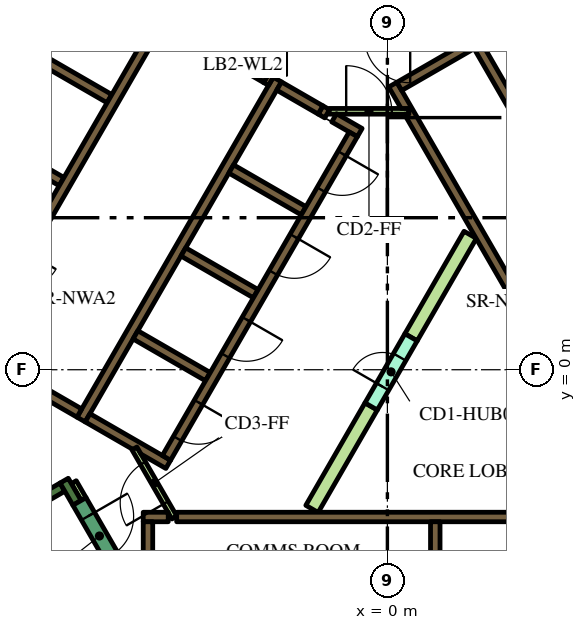
"""IFC4 building model, lengths in metres.
Left out: names, types, materials, properties, quantities, classifications, styles, units other than length and angle.
Written with IfcOpenShell. Run it as: python <this file> out.ifc"""

import sys

from ifc_helpers import new_model, si_unit, direction, frame, frame_2d, origin, place, context, subcontext, project, spatial, polyline, rectangle, outline, extrude, element, fill, save


model = new_model("IFC4")
c1 = context("Model", 3, precision=1e-05, world=origin(), true_north=direction((0.0, 1.0)))
c2 = subcontext(c1, "Body", "Model", "MODEL_VIEW")
j1 = project(units=[si_unit("LENGTHUNIT", "METRE"), si_unit("PLANEANGLEUNIT", "RADIAN")], contexts=[c1])
p1 = place(None, origin())
s1 = spatial("IfcSite", under=j1, at=p1, CompositionType="ELEMENT")
p2 = place(p1, origin())
s2 = spatial("IfcBuilding", under=s1, at=p2, CompositionType="ELEMENT")
p3 = place(p2, frame((0.0, 0.0, 111.0)))
s3 = spatial("IfcBuildingStorey", under=s2, at=p3, CompositionType="ELEMENT", Elevation=111.0)
p4 = place(p3, frame((-15.36, -1.503, 0.0), z_axis=(0.0, 0.0, 1.0), x_axis=(0.50000389221, 0.866023156604, 0.0)))
e1 = element("IfcWall", 1, at=p4, inside=s3, PredefinedType="SOLIDWALL", context=c2, shape_type="SweptSolid", body=[
    extrude(rectangle(XDim=21.0, YDim=0.9, at=frame_2d((10.5, 0.0))), origin(), (0.0, 0.0, 1.0), 3.9),
])
p5 = place(p3, frame((-14.44, -6.49, 0.0), z_axis=(0.0, 0.0, 1.0), x_axis=(0.866022966069, 0.500004222222, 0.0)))
e2 = element("IfcWall", 2, at=p5, inside=s3, PredefinedType="SOLIDWALL", context=c2, shape_type="SweptSolid", body=[
    extrude(rectangle(XDim=6.8, YDim=0.25, at=frame_2d((3.4, 0.0))), origin(), (0.0, 0.0, 1.0), 3.9),
])
p6 = place(p3, frame((-8.168, -3.503, 0.0), z_axis=(0.0, 0.0, 1.0), x_axis=(-0.499952099219, 0.866053057547, 0.0)))
e3 = element("IfcWall", 3, at=p6, inside=s3, PredefinedType="SOLIDWALL", context=c2, shape_type="SweptSolid", body=[
    extrude(rectangle(XDim=0.675, YDim=0.25, at=frame_2d((0.337, 0.0))), origin(), (0.0, 0.0, 1.0), 3.9),
])
p7 = place(p3, frame((-5.545, -3.875, 0.0), z_axis=(0.0, 0.0, 1.0), x_axis=(1.0, 0.0, 0.0)))
e4 = element("IfcWall", 4, at=p7, inside=s3, PredefinedType="SOLIDWALL", context=c2, shape_type="SweptSolid", body=[
    extrude(rectangle(XDim=11.97, YDim=0.25, at=frame_2d((5.985, 0.0))), origin(), (0.0, 0.0, 1.0), 3.9),
])
p8 = place(p3, frame((-6.425, -3.875, 0.0), z_axis=(0.0, 0.0, 1.0), x_axis=(1.0, 0.0, 0.0)))
e5 = element("IfcWall", 5, at=p8, inside=s3, PredefinedType="SOLIDWALL", context=c2, shape_type="SweptSolid", body=[
    extrude(rectangle(XDim=0.658, YDim=0.25, at=frame_2d((0.329, 0.0))), origin(), (0.0, 0.0, 1.0), 3.9),
])
p9 = place(p3, frame((1.26, -4.0, 0.0), z_axis=(0.0, 0.0, 1.0), x_axis=(0.0, -1.0, 0.0)))
e6 = element("IfcWall", 6, at=p9, inside=s3, PredefinedType="SOLIDWALL", context=c2, shape_type="SweptSolid", body=[
    extrude(rectangle(XDim=2.2, YDim=0.25, at=frame_2d((1.1, 0.0))), origin(), (0.0, 0.0, 1.0), 3.9),
])
p10 = place(p3, frame((-6.3, -4.0, 0.0), z_axis=(0.0, 0.0, 1.0), x_axis=(0.0, -1.0, 0.0)))
e7 = element("IfcWall", 7, at=p10, inside=s3, PredefinedType="SOLIDWALL", context=c2, shape_type="SweptSolid", body=[
    extrude(rectangle(XDim=3.154, YDim=0.25, at=frame_2d((1.577, 0.0))), origin(), (0.0, 0.0, 1.0), 3.9),
])
p11 = place(p3, origin())
e8 = element("IfcWall", 8, at=p11, inside=s3, PredefinedType="SOLIDWALL", context=c2, shape_type="SweptSolid", body=[
    extrude(outline(polyline([(0.566, 6.725), (0.566, 6.875), (0.566, 6.875), (0.565, 6.875), (0.361, 6.875), (0.035, 7.439), (0.252, 7.564), (0.377, 7.348), (6.552, -3.348), (6.677, -3.564), (6.46, -3.689), (0.448, 6.725), (0.565, 6.725), (0.566, 6.725), (0.566, 6.725)])), origin(), (0.0, 0.0, 1.0), 3.9),
])
p12 = place(p3, frame((0.314, 7.456, 0.0), z_axis=(0.0, 0.0, 1.0), x_axis=(0.866013897511, 0.50001992892, 0.0)))
e9 = element("IfcWall", 9, at=p12, inside=s3, PredefinedType="SOLIDWALL", context=c2, shape_type="SweptSolid", body=[
    extrude(rectangle(XDim=3.268, YDim=0.25, at=frame_2d((1.634, 0.0))), origin(), (0.0, 0.0, 1.0), 3.9),
])
p13 = place(p3, frame((-8.06, -1.311, 0.0), z_axis=(0.0, 0.0, 1.0), x_axis=(0.50000273126, 0.866023826885, 0.0)))
e10 = element("IfcWall", 10, at=p13, inside=s3, PredefinedType="SOLIDWALL", context=c2, shape_type="SweptSolid", body=[
    extrude(rectangle(XDim=10.33, YDim=0.25, at=frame_2d((5.165, 0.0))), origin(), (0.0, 0.0, 1.0), 3.9),
])
p14 = place(p3, frame((-1.758, 6.835, 0.0), z_axis=(0.0, 0.0, 1.0), x_axis=(0.865982457891, -0.500074377092, 0.0)))
e11 = element("IfcWall", 11, at=p14, inside=s3, PredefinedType="SOLIDWALL", context=c2, shape_type="SweptSolid", body=[
    extrude(rectangle(XDim=0.2, YDim=0.25, at=frame_2d((0.1, 0.0))), origin(), (0.0, 0.0, 1.0), 3.9),
])
p15 = place(p3, frame((-1.76, 6.836, 0.0), z_axis=(0.0, 0.0, 1.0), x_axis=(-0.865952863304, 0.500125622755, 0.0)))
e12 = element("IfcWall", 12, at=p15, inside=s3, PredefinedType="SOLIDWALL", context=c2, shape_type="SweptSolid", body=[
    extrude(rectangle(XDim=1.258, YDim=0.25, at=frame_2d((0.629, 0.0))), origin(), (0.0, 0.0, 1.0), 3.9),
])
p16 = place(p3, frame((-0.728, 6.24, 0.0), z_axis=(0.0, 0.0, 1.0), x_axis=(-0.865955664968, 0.500120771724, 0.0)))
e13 = element("IfcWall", 13, at=p16, inside=s3, PredefinedType="SOLIDWALL", context=c2, shape_type="SweptSolid", body=[
    extrude(rectangle(XDim=0.778, YDim=0.25, at=frame_2d((0.389, 0.0))), origin(), (0.0, 0.0, 1.0), 3.9),
])
for number, where, z_axis, x_axis in (
    (14, (-2.204, 4.182, 0.0), (0.0, 0.0, 1.0), (-0.866, 0.5, 0.0)),
    (15, (-5.369, 3.1, 0.0), (0.0, 0.0, 1.0), (0.866, -0.5, 0.0)),
    (16, (-4.724, -0.182, 0.0), (0.0, 0.0, 1.0), (-0.866, 0.5, 0.0)),
):
    element("IfcWall", number, at=place(p3, frame(where, z_axis=z_axis, x_axis=x_axis)), inside=s3, PredefinedType="SOLIDWALL", context=c2, shape_type="SweptSolid", body=[
        extrude(rectangle(XDim=2.2, YDim=0.25, at=frame_2d((1.1, 0.0))), origin(), (0.0, 0.0, 1.0), 3.9),
    ])
e17 = element("IfcWall", 17, at=p11, inside=s3, PredefinedType="SOLIDWALL", context=c2, shape_type="SweptSolid", body=[
    extrude(outline(polyline([(-5.922, -2.257), (-5.922, -2.257), (-5.705, -2.382), (-5.83, -2.598), (-6.483, -2.221), (-6.591, -2.033), (-6.591, -2.033), (-6.7, -2.096), (-7.952, -1.373), (-7.827, -1.156), (-5.922, -2.257)])), origin(), (0.0, 0.0, 1.0), 3.9),
])
p17 = place(p3, frame((-8.106, -1.14, 0.0), z_axis=(0.0, 0.0, 1.0), x_axis=(-0.866000643155, 0.500042884217, 0.0)))
e18 = element("IfcWall", 18, at=p17, inside=s3, PredefinedType="SOLIDWALL", context=c2, shape_type="SweptSolid", body=[
    extrude(rectangle(XDim=5.65, YDim=0.25, at=frame_2d((2.825, 0.0))), origin(), (0.0, 0.0, 1.0), 3.9),
])
e19 = element("IfcWall", 19, at=p11, inside=s3, PredefinedType="SOLIDWALL", context=c2, shape_type="SweptSolid", body=[
    extrude(outline(polyline([(-3.128, 7.481), (-3.259, 7.557), (-3.134, 7.773), (-3.003, 7.698), (-3.128, 7.481)])), origin(), (0.0, 0.0, 1.0), 3.9),
])
for number, where, z_axis, x_axis in (
    (20, (-8.574, 4.95, 0.0), (0.0, 0.0, 1.0), (-0.866, 0.5, 0.0)),
    (21, (-7.314, 7.132, 0.0), (0.0, 0.0, 1.0), (-0.866, 0.5, 0.0)),
):
    element("IfcWall", number, at=place(p3, frame(where, z_axis=z_axis, x_axis=x_axis)), inside=s3, PredefinedType="SOLIDWALL", context=c2, shape_type="SweptSolid", body=[
        extrude(rectangle(XDim=2.2, YDim=0.25, at=frame_2d((1.1, 0.0))), origin(), (0.0, 0.0, 1.0), 3.9),
    ])
p18 = place(p3, frame((-7.959, 10.415, 0.0), z_axis=(0.0, 0.0, 1.0), x_axis=(0.866020958405, -0.500007699544, 0.0)))
e22 = element("IfcWall", 22, at=p18, inside=s3, PredefinedType="SOLIDWALL", context=c2, shape_type="SweptSolid", body=[
    extrude(rectangle(XDim=4.1, YDim=0.25, at=frame_2d((2.05, 0.0))), origin(), (0.0, 0.0, 1.0), 3.9),
])
p19 = place(p3, frame((-8.252, -2.958, 0.0), z_axis=(0.0, 0.0, 1.0), x_axis=(0.500174715838, -0.865924508047, 0.0)))
e23 = element("IfcWall", 23, at=p19, inside=s3, PredefinedType="PARTITIONING", context=c2, shape_type="SweptSolid", body=[
    extrude(rectangle(XDim=0.514, YDim=0.15, at=frame_2d((0.257, 0.0))), origin(), (0.0, 0.0, 1.0), 2.75),
])
e24 = element("IfcWall", 24, at=p11, inside=s3, PredefinedType="PARTITIONING", context=c2, shape_type="SweptSolid", body=[
    extrude(outline(polyline([(-0.59, -0.872), (-0.265, -1.059), (-1.822, -3.756), (-2.147, -3.568), (-0.59, -0.872)])), origin(), (0.0, 0.0, 1.0), 2.75),
])
e25 = element("IfcWall", 25, at=p11, inside=s3, PredefinedType="PARTITIONING", context=c2, shape_type="SweptSolid", body=[
    extrude(outline(polyline([(2.017, 3.643), (2.342, 3.456), (0.785, 0.76), (0.46, 0.947), (2.017, 3.643)])), origin(), (0.0, 0.0, 1.0), 2.75),
])
p20 = place(p3, frame((8.565, -2.185, 0.0), z_axis=(0.0, 0.0, 1.0), x_axis=(-0.499997954832, 0.866026584559, 0.0)))
e26 = element("IfcWall", 26, at=p20, inside=s3, PredefinedType="SOLIDWALL", context=c2, shape_type="SweptSolid", body=[
    extrude(rectangle(XDim=12.35, YDim=0.25, at=frame_2d((6.175, 0.0))), origin(), (0.0, 0.0, 1.0), 3.9),
])
p21 = place(p20, frame((5.725, 0.0, 0.0)))
e27 = element("IfcOpeningElement", 27, at=p21, cuts=e26, PredefinedType="OPENING", context=c2, shape_type="SweptSolid", body=[
    extrude(rectangle(XDim=0.9, YDim=2.1, at=frame_2d((0.45, 1.05))), frame((0.0, 0.135, 0.0), z_axis=(0.0, -1.0, 0.0), x_axis=(1.0, 0.0, 0.0)), (0.0, 0.0, 1.0), 0.27),
])
p22 = place(p3, frame((-6.008, 9.144, 0.0), z_axis=(0.0, 0.0, 1.0), x_axis=(-0.500006956611, -0.866021387346, 0.0)))
e28 = element("IfcWall", 28, at=p22, inside=s3, PredefinedType="SOLIDWALL", context=c2, shape_type="SweptSolid", body=[
    extrude(rectangle(XDim=9.83, YDim=0.25, at=frame_2d((4.915, 0.0))), origin(), (0.0, 0.0, 1.0), 3.9),
])
p23 = place(p22, frame((6.985, 0.0, 0.0)))
e29 = element("IfcOpeningElement", 29, at=p23, cuts=e28, PredefinedType="OPENING", context=c2, shape_type="SweptSolid", body=[
    extrude(rectangle(XDim=0.9, YDim=2.1, at=frame_2d((0.45, 1.05))), frame((0.0, 0.135, 0.0), z_axis=(0.0, -1.0, 0.0), x_axis=(1.0, 0.0, 0.0)), (0.0, 0.0, 1.0), 0.27),
])
p24 = place(p3, frame((-0.898, 6.194, 0.0), z_axis=(0.0, 0.0, 1.0), x_axis=(-0.499996202215, -0.866027596426, 0.0)))
e30 = element("IfcWall", 30, at=p24, inside=s3, PredefinedType="SOLIDWALL", context=c2, shape_type="SweptSolid", body=[
    extrude(rectangle(XDim=9.83, YDim=0.25, at=frame_2d((4.915, 0.0))), origin(), (0.0, 0.0, 1.0), 3.9),
])
p25 = place(p24, frame((0.585, 0.0, 0.0)))
e31 = element("IfcOpeningElement", 31, at=p25, cuts=e30, PredefinedType="OPENING", context=c2, shape_type="SweptSolid", body=[
    extrude(rectangle(XDim=1.1, YDim=2.1, at=frame_2d((0.55, 1.05))), frame((0.0, 0.135, 0.0), z_axis=(0.0, -1.0, 0.0), x_axis=(1.0, 0.0, 0.0)), (0.0, 0.0, 1.0), 0.27),
])
p26 = place(p24, frame((3.105, 0.0, 0.0)))
e32 = element("IfcOpeningElement", 32, at=p26, cuts=e30, PredefinedType="OPENING", context=c2, shape_type="SweptSolid", body=[
    extrude(rectangle(XDim=1.1, YDim=2.1, at=frame_2d((0.55, 1.05))), frame((0.0, 0.135, 0.0), z_axis=(0.0, -1.0, 0.0), x_axis=(1.0, 0.0, 0.0)), (0.0, 0.0, 1.0), 0.27),
])
p27 = place(p24, frame((5.625, 0.0, 0.0)))
e33 = element("IfcOpeningElement", 33, at=p27, cuts=e30, PredefinedType="OPENING", context=c2, shape_type="SweptSolid", body=[
    extrude(rectangle(XDim=1.1, YDim=2.1, at=frame_2d((0.55, 1.05))), frame((0.0, 0.135, 0.0), z_axis=(0.0, -1.0, 0.0), x_axis=(1.0, 0.0, 0.0)), (0.0, 0.0, 1.0), 0.27),
])
p28 = place(p24, frame((8.145, 0.0, 0.0)))
e34 = element("IfcOpeningElement", 34, at=p28, cuts=e30, PredefinedType="OPENING", context=c2, shape_type="SweptSolid", body=[
    extrude(rectangle(XDim=1.1, YDim=2.1, at=frame_2d((0.55, 1.05))), frame((0.0, 0.135, 0.0), z_axis=(0.0, -1.0, 0.0), x_axis=(1.0, 0.0, 0.0)), (0.0, 0.0, 1.0), 0.27),
])
p29 = place(p3, frame((-8.103, -3.466, 0.0), z_axis=(0.0, 0.0, 1.0), x_axis=(0.500078061341, -0.865980330357, 0.0)))
e35 = element("IfcWall", 35, at=p29, inside=s3, PredefinedType="SOLIDWALL", context=c2, shape_type="SweptSolid", body=[
    extrude(rectangle(XDim=2.1, YDim=0.4, at=frame_2d((1.05, 0.0))), origin(), (0.0, 0.0, 1.0), 3.9),
])
p30 = place(p29, frame((0.45, 0.0, 0.0)))
e36 = element("IfcOpeningElement", 36, at=p30, cuts=e35, PredefinedType="OPENING", context=c2, shape_type="SweptSolid", body=[
    extrude(rectangle(XDim=1.2, YDim=2.1, at=frame_2d((0.6, 1.05))), frame((0.0, 0.21, 0.0), z_axis=(0.0, -1.0, 0.0), x_axis=(1.0, 0.0, 0.0)), (0.0, 0.0, 1.0), 0.42),
])
p31 = place(p3, frame((-0.427, -0.966, 0.0), z_axis=(0.0, 0.0, 1.0), x_axis=(0.49994051562, 0.866059744384, 0.0)))
e37 = element("IfcWall", 37, at=p31, inside=s3, PredefinedType="PARTITIONING", context=c2, shape_type="SweptSolid", body=[
    extrude(rectangle(XDim=2.1, YDim=0.375, at=frame_2d((1.05, 0.0))), origin(), (0.0, 0.0, 1.0), 2.75),
])
p32 = place(p31, frame((0.6, 0.0, 0.0)))
e38 = element("IfcOpeningElement", 38, at=p32, cuts=e37, PredefinedType="OPENING", context=c2, shape_type="SweptSolid", body=[
    extrude(rectangle(XDim=0.9, YDim=2.1, at=frame_2d((0.45, 1.05))), frame((0.0, 0.198, 0.0), z_axis=(0.0, -1.0, 0.0), x_axis=(1.0, 0.0, 0.0)), (0.0, 0.0, 1.0), 0.395),
])
p33 = place(p3, frame((-1.534, 6.8, 0.0), z_axis=(0.0, 0.0, 1.0), x_axis=(1.0, 0.0, 0.0)))
e39 = element("IfcWall", 39, at=p33, inside=s3, PredefinedType="PARTITIONING", context=c2, shape_type="SweptSolid", body=[
    extrude(rectangle(XDim=2.1, YDim=0.15, at=frame_2d((1.05, 0.0))), origin(), (0.0, 0.0, 1.0), 2.75),
])
p34 = place(p33, frame((0.45, 0.0, 0.0)))
e40 = element("IfcOpeningElement", 40, at=p34, cuts=e39, PredefinedType="OPENING", context=c2, shape_type="SweptSolid", body=[
    extrude(rectangle(XDim=1.2, YDim=2.1, at=frame_2d((0.6, 1.05))), frame((0.0, 0.085, 0.0), z_axis=(0.0, -1.0, 0.0), x_axis=(1.0, 0.0, 0.0)), (0.0, 0.0, 1.0), 0.17),
])
p35 = place(p3, frame((-5.606, -3.89, 0.0), z_axis=(0.0, 0.0, 1.0), x_axis=(-0.500027713859, 0.866009402589, 0.0)))
e41 = element("IfcWall", 41, at=p35, inside=s3, PredefinedType="PARTITIONING", context=c2, shape_type="SweptSolid", body=[
    extrude(rectangle(XDim=2.1, YDim=0.15, at=frame_2d((1.05, 0.0))), origin(), (0.0, 0.0, 1.0), 2.75),
])
p36 = place(p35, frame((0.45, 0.0, 0.0)))
e42 = element("IfcOpeningElement", 42, at=p36, cuts=e41, PredefinedType="OPENING", context=c2, shape_type="SweptSolid", body=[
    extrude(rectangle(XDim=1.2, YDim=2.1, at=frame_2d((0.6, 1.05))), frame((0.0, 0.085, 0.0), z_axis=(0.0, -1.0, 0.0), x_axis=(1.0, 0.0, 0.0)), (0.0, 0.0, 1.0), 0.17),
])
p37 = place(p3, frame((-4.409, 8.365, 0.0), z_axis=(0.0, 0.0, 1.0), x_axis=(0.866034573852, -0.49998411664, 0.0)))
e43 = element("IfcWall", 43, at=p37, inside=s3, PredefinedType="SOLIDWALL", context=c2, shape_type="SweptSolid", body=[
    extrude(rectangle(XDim=1.4, YDim=0.25, at=frame_2d((0.7, 0.0))), origin(), (0.0, 0.0, 1.0), 3.9),
])
p38 = place(p37, frame((0.1, 0.0, 0.0)))
e44 = element("IfcOpeningElement", 44, at=p38, cuts=e43, PredefinedType="OPENING", context=c2, shape_type="SweptSolid", body=[
    extrude(rectangle(XDim=1.2, YDim=2.1, at=frame_2d((0.6, 1.05))), frame((0.0, 0.135, 0.0), z_axis=(0.0, -1.0, 0.0), x_axis=(1.0, 0.0, 0.0)), (0.0, 0.0, 1.0), 0.27),
])
p39 = place(p3, frame((-19.081, -3.9, 0.0), z_axis=(0.0, 0.0, 1.0), x_axis=(0.499998313975, 0.866026377209, 0.0)))
e45 = element("IfcWall", 45, at=p39, inside=s3, PredefinedType="PARTITIONING", context=c2, shape_type="SweptSolid", body=[
    extrude(rectangle(XDim=25.766, YDim=0.15, at=frame_2d((12.883, 0.0))), origin(), (0.0, 0.0, 1.0), 2.75),
])
p40 = place(p39, frame((19.306, 0.0, 0.0)))
e46 = element("IfcOpeningElement", 46, at=p40, cuts=e45, PredefinedType="OPENING", context=c2, shape_type="SweptSolid", body=[
    extrude(rectangle(XDim=1.0, YDim=2.1, at=frame_2d((0.5, 1.05))), frame((0.0, 0.085, 0.0), z_axis=(0.0, -1.0, 0.0), x_axis=(1.0, 0.0, 0.0)), (0.0, 0.0, 1.0), 0.17),
])
p41 = place(p39, frame((18.0, 0.0, 0.0)))
e47 = element("IfcOpeningElement", 47, at=p41, cuts=e45, PredefinedType="OPENING", context=c2, shape_type="SweptSolid", body=[
    extrude(rectangle(XDim=1.0, YDim=2.1, at=frame_2d((0.5, 1.05))), frame((0.0, 0.085, 0.0), z_axis=(0.0, -1.0, 0.0), x_axis=(1.0, 0.0, 0.0)), (0.0, 0.0, 1.0), 0.17),
])
p42 = place(p39, frame((6.838, 0.0, 0.0)))
e48 = element("IfcOpeningElement", 48, at=p42, cuts=e45, PredefinedType="OPENING", context=c2, shape_type="SweptSolid", body=[
    extrude(rectangle(XDim=1.0, YDim=2.1, at=frame_2d((0.5, 1.05))), frame((0.0, 0.085, 0.0), z_axis=(0.0, -1.0, 0.0), x_axis=(1.0, 0.0, 0.0)), (0.0, 0.0, 1.0), 0.17),
])
p43 = place(p39, frame((4.674, 0.0, 0.0)))
e49 = element("IfcOpeningElement", 49, at=p43, cuts=e45, PredefinedType="OPENING", context=c2, shape_type="SweptSolid", body=[
    extrude(rectangle(XDim=0.9, YDim=2.1, at=frame_2d((0.45, 1.05))), frame((0.0, 0.085, 0.0), z_axis=(0.0, -1.0, 0.0), x_axis=(1.0, 0.0, 0.0)), (0.0, 0.0, 1.0), 0.17),
])
p44 = place(p39, frame((0.18, 0.0, 0.0)))
e50 = element("IfcOpeningElement", 50, at=p44, cuts=e45, PredefinedType="OPENING", context=c2, shape_type="SweptSolid", body=[
    extrude(rectangle(XDim=1.0, YDim=2.1, at=frame_2d((0.5, 1.05))), frame((0.0, 0.085, 0.0), z_axis=(0.0, -1.0, 0.0), x_axis=(1.0, 0.0, 0.0)), (0.0, 0.0, 1.0), 0.17),
])
p45 = place(p25, origin())
e51 = element("IfcDoor", 51, at=p45, inside=s3, OperationType="DOUBLE_DOOR_SLIDING", PredefinedType="DOOR", context=c2, shape_type="SweptSolid", body=[
    extrude(rectangle(XDim=1.1, YDim=2.1, at=frame_2d((0.55, 1.05))), frame((0.0, 0.025, 0.0), z_axis=(0.0, -1.0, 0.0), x_axis=(1.0, 0.0, 0.0)), (0.0, 0.0, 1.0), 0.05),
])
fill(e31, e51)
p46 = place(p26, origin())
e52 = element("IfcDoor", 52, at=p46, inside=s3, OperationType="DOUBLE_DOOR_SLIDING", PredefinedType="DOOR", context=c2, shape_type="SweptSolid", body=[
    extrude(rectangle(XDim=1.1, YDim=2.1, at=frame_2d((0.55, 1.05))), frame((0.0, 0.025, 0.0), z_axis=(0.0, -1.0, 0.0), x_axis=(1.0, 0.0, 0.0)), (0.0, 0.0, 1.0), 0.05),
])
fill(e32, e52)
p47 = place(p27, origin())
e53 = element("IfcDoor", 53, at=p47, inside=s3, OperationType="DOUBLE_DOOR_SLIDING", PredefinedType="DOOR", context=c2, shape_type="SweptSolid", body=[
    extrude(rectangle(XDim=1.1, YDim=2.1, at=frame_2d((0.55, 1.05))), frame((0.0, 0.025, 0.0), z_axis=(0.0, -1.0, 0.0), x_axis=(1.0, 0.0, 0.0)), (0.0, 0.0, 1.0), 0.05),
])
fill(e33, e53)
p48 = place(p28, origin())
e54 = element("IfcDoor", 54, at=p48, inside=s3, OperationType="DOUBLE_DOOR_SLIDING", PredefinedType="DOOR", context=c2, shape_type="SweptSolid", body=[
    extrude(rectangle(XDim=1.1, YDim=2.1, at=frame_2d((0.55, 1.05))), frame((0.0, 0.025, 0.0), z_axis=(0.0, -1.0, 0.0), x_axis=(1.0, 0.0, 0.0)), (0.0, 0.0, 1.0), 0.05),
])
fill(e34, e54)
p49 = place(p30, origin())
e55 = element("IfcDoor", 55, at=p49, inside=s3, OperationType="SINGLE_SWING_LEFT", PredefinedType="DOOR", context=c2, shape_type="SweptSolid", body=[
    extrude(rectangle(XDim=1.2, YDim=2.1, at=frame_2d((0.6, 1.05))), frame((0.0, 0.025, 0.0), z_axis=(0.0, -1.0, 0.0), x_axis=(1.0, 0.0, 0.0)), (0.0, 0.0, 1.0), 0.05),
])
fill(e36, e55)
p50 = place(p32, origin())
e56 = element("IfcDoor", 56, at=p50, inside=s3, OperationType="SINGLE_SWING_LEFT", PredefinedType="DOOR", context=c2, shape_type="SweptSolid", body=[
    extrude(rectangle(XDim=0.9, YDim=2.1, at=frame_2d((0.45, 1.05))), frame((0.0, 0.025, 0.0), z_axis=(0.0, -1.0, 0.0), x_axis=(1.0, 0.0, 0.0)), (0.0, 0.0, 1.0), 0.05),
])
fill(e38, e56)
p51 = place(p34, origin())
e57 = element("IfcDoor", 57, at=p51, inside=s3, OperationType="SINGLE_SWING_LEFT", PredefinedType="DOOR", context=c2, shape_type="SweptSolid", body=[
    extrude(rectangle(XDim=1.2, YDim=2.1, at=frame_2d((0.6, 1.05))), frame((0.0, 0.025, 0.0), z_axis=(0.0, -1.0, 0.0), x_axis=(1.0, 0.0, 0.0)), (0.0, 0.0, 1.0), 0.05),
])
fill(e40, e57)
p52 = place(p36, origin())
e58 = element("IfcDoor", 58, at=p52, inside=s3, OperationType="SINGLE_SWING_LEFT", PredefinedType="DOOR", context=c2, shape_type="SweptSolid", body=[
    extrude(rectangle(XDim=1.2, YDim=2.1, at=frame_2d((0.6, 1.05))), frame((0.0, 0.025, 0.0), z_axis=(0.0, -1.0, 0.0), x_axis=(1.0, 0.0, 0.0)), (0.0, 0.0, 1.0), 0.05),
])
fill(e42, e58)
p53 = place(p38, origin())
e59 = element("IfcDoor", 59, at=p53, inside=s3, OperationType="SINGLE_SWING_LEFT", PredefinedType="DOOR", context=c2, shape_type="SweptSolid", body=[
    extrude(rectangle(XDim=1.2, YDim=2.1, at=frame_2d((0.6, 1.05))), frame((0.0, 0.025, 0.0), z_axis=(0.0, -1.0, 0.0), x_axis=(1.0, 0.0, 0.0)), (0.0, 0.0, 1.0), 0.05),
])
fill(e44, e59)
save(model, sys.argv[1])
